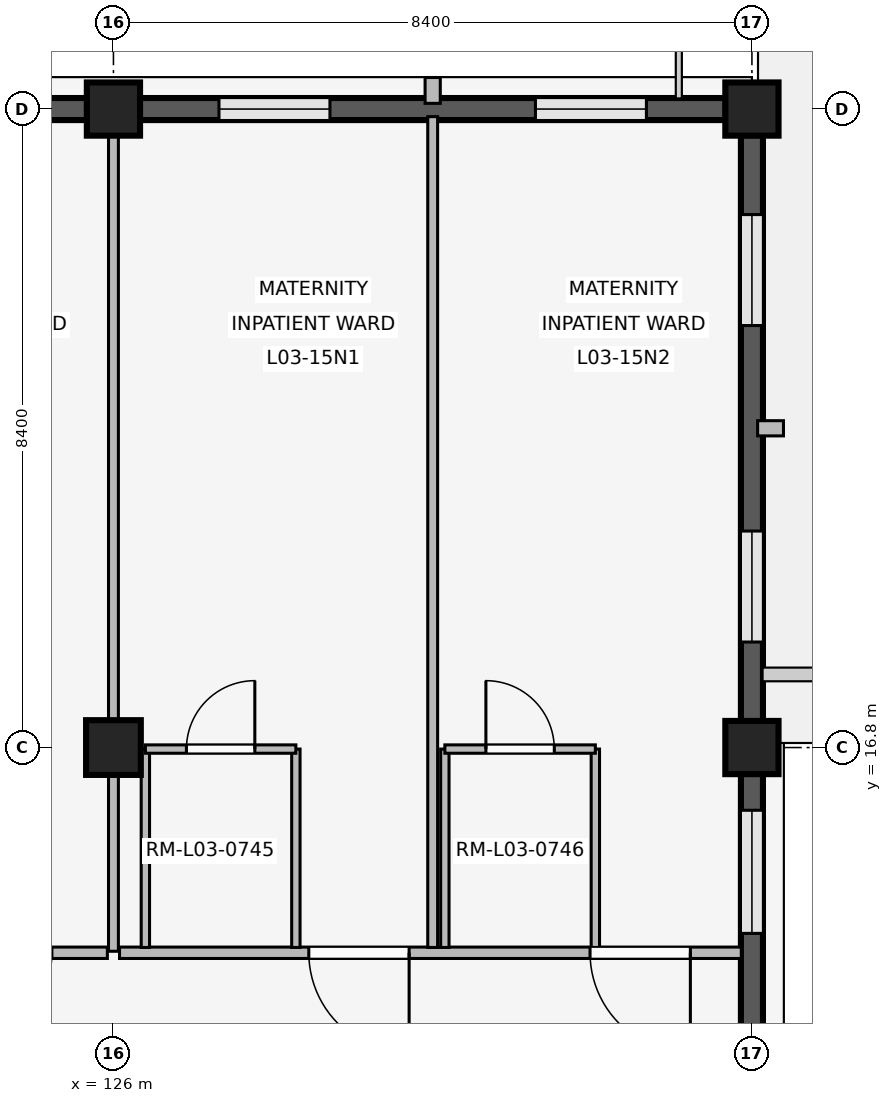
"""IFC4 building model, lengths in metres.
Left out: names, types, materials, properties, quantities, classifications, styles, units other than length and angle.
Written with IfcOpenShell. Run it as: python <this file> out.ifc"""

import sys

from ifc_helpers import new_model, si_unit, direction, frame, frame_2d, origin, origin_2d, place, context, subcontext, project, spatial, rectangle, extrude, element, fill, save


model = new_model("IFC4")
c1 = context("Model", 3, precision=1e-05, world=origin(), true_north=direction((0.0, 1.0)))
c2 = subcontext(c1, "Body", "Model", "MODEL_VIEW")
j1 = project(units=[si_unit("LENGTHUNIT", "METRE"), si_unit("PLANEANGLEUNIT", "RADIAN")], contexts=[c1])
p1 = place(None, origin())
s1 = spatial("IfcSite", under=j1, at=p1, CompositionType="ELEMENT")
p2 = place(p1, origin())
s2 = spatial("IfcBuilding", under=s1, at=p2, CompositionType="ELEMENT")
p3 = place(p2, frame((0.0, 0.0, 12.9)))
s3 = spatial("IfcBuildingStorey", under=s2, at=p3, CompositionType="ELEMENT", Elevation=12.9)
p4 = place(p3, frame((126.0, 16.8, 0.0), z_axis=(0.0, 0.0, 1.0), x_axis=(1.0, 0.0, 0.0)))
e1 = element("IfcColumn", 1, at=p4, inside=s3, PredefinedType="COLUMN", context=c2, shape_type="SweptSolid", body=[
    extrude(rectangle(XDim=0.72, YDim=0.72, at=origin_2d()), origin(), (0.0, 0.0, 1.0), 3.3),
])
for number, where, z_axis, x_axis in (
    (2, (126.0, 25.2, 0.0), (0.0, 0.0, 1.0), (1.0, 0.0, 0.0)),
    (3, (134.4, 16.8, 0.0), (0.0, 0.0, 1.0), (1.0, 0.0, 0.0)),
    (4, (134.4, 25.2, 0.0), (0.0, 0.0, 1.0), (1.0, 0.0, 0.0)),
):
    element("IfcColumn", number, at=place(p3, frame(where, z_axis=z_axis, x_axis=x_axis)), inside=s3, PredefinedType="COLUMN", context=c2, shape_type="SweptSolid", body=[
        extrude(rectangle(XDim=0.7, YDim=0.7, at=origin_2d()), origin(), (0.0, 0.0, 1.0), 3.3),
    ])
p5 = place(p3, frame((117.945, 25.2, 0.0), z_axis=(0.0, 0.0, 1.0), x_axis=(1.0, 0.0, 0.0)))
e5 = element("IfcWall", 5, at=p5, inside=s3, PredefinedType="SOLIDWALL", context=c2, shape_type="SweptSolid", body=[
    extrude(rectangle(XDim=7.71, YDim=0.29, at=frame_2d((3.855, 0.0))), origin(), (0.0, 0.0, 1.0), 2.44),
])
p6 = place(p5, frame((0.963, 0.0, 0.85)))
e6 = element("IfcOpeningElement", 6, at=p6, cuts=e5, PredefinedType="OPENING", context=c2, shape_type="SweptSolid", body=[
    extrude(rectangle(XDim=1.62, YDim=0.95, at=frame_2d((0.81, 0.475))), frame((0.0, 0.155, 0.0), z_axis=(0.0, -1.0, 0.0), x_axis=(1.0, 0.0, 0.0)), (0.0, 0.0, 1.0), 0.31),
])
p7 = place(p5, frame((5.127, 0.0, 0.85)))
e7 = element("IfcOpeningElement", 7, at=p7, cuts=e5, PredefinedType="OPENING", context=c2, shape_type="SweptSolid", body=[
    extrude(rectangle(XDim=1.62, YDim=0.95, at=frame_2d((0.81, 0.475))), frame((0.0, 0.155, 0.0), z_axis=(0.0, -1.0, 0.0), x_axis=(1.0, 0.0, 0.0)), (0.0, 0.0, 1.0), 0.31),
])
p8 = place(p3, frame((134.4, 16.455, 0.0), z_axis=(0.0, 0.0, 1.0), x_axis=(0.0, -1.0, 0.0)))
e8 = element("IfcWall", 8, at=p8, inside=s3, PredefinedType="SOLIDWALL", context=c2, shape_type="SweptSolid", body=[
    extrude(rectangle(XDim=7.71, YDim=0.29, at=frame_2d((3.855, 0.0))), origin(), (0.0, 0.0, 1.0), 2.44),
])
p9 = place(p8, frame((0.48, 0.0, 0.85)))
e9 = element("IfcOpeningElement", 9, at=p9, cuts=e8, PredefinedType="OPENING", context=c2, shape_type="SweptSolid", body=[
    extrude(rectangle(XDim=1.62, YDim=0.95, at=frame_2d((0.81, 0.475))), frame((0.0, 0.155, 0.0), z_axis=(0.0, -1.0, 0.0), x_axis=(1.0, 0.0, 0.0)), (0.0, 0.0, 1.0), 0.31),
])
p10 = place(p8, frame((5.61, 0.0, 0.85)))
e10 = element("IfcOpeningElement", 10, at=p10, cuts=e8, PredefinedType="OPENING", context=c2, shape_type="SweptSolid", body=[
    extrude(rectangle(XDim=1.62, YDim=0.95, at=frame_2d((0.81, 0.475))), frame((0.0, 0.155, 0.0), z_axis=(0.0, -1.0, 0.0), x_axis=(1.0, 0.0, 0.0)), (0.0, 0.0, 1.0), 0.31),
])
p11 = place(p3, frame((126.345, 25.2, 0.0), z_axis=(0.0, 0.0, 1.0), x_axis=(1.0, 0.0, 0.0)))
e11 = element("IfcWall", 11, at=p11, inside=s3, PredefinedType="SOLIDWALL", context=c2, shape_type="SweptSolid", body=[
    extrude(rectangle(XDim=7.71, YDim=0.29, at=frame_2d((3.855, 0.0))), origin(), (0.0, 0.0, 1.0), 2.44),
])
p12 = place(p11, frame((1.043, 0.0, 0.85)))
e12 = element("IfcOpeningElement", 12, at=p12, cuts=e11, PredefinedType="OPENING", context=c2, shape_type="SweptSolid", body=[
    extrude(rectangle(XDim=1.46, YDim=0.85, at=frame_2d((0.73, 0.425))), frame((0.0, 0.155, 0.0), z_axis=(0.0, -1.0, 0.0), x_axis=(1.0, 0.0, 0.0)), (0.0, 0.0, 1.0), 0.31),
])
p13 = place(p11, frame((5.207, 0.0, 0.85)))
e13 = element("IfcOpeningElement", 13, at=p13, cuts=e11, PredefinedType="OPENING", context=c2, shape_type="SweptSolid", body=[
    extrude(rectangle(XDim=1.46, YDim=0.85, at=frame_2d((0.73, 0.425))), frame((0.0, 0.155, 0.0), z_axis=(0.0, -1.0, 0.0), x_axis=(1.0, 0.0, 0.0)), (0.0, 0.0, 1.0), 0.31),
])
p14 = place(p3, frame((130.2, 25.275, 0.0), z_axis=(0.0, 0.0, 1.0), x_axis=(0.0, 1.0, 0.0)))
e14 = element("IfcWall", 14, at=p14, inside=s3, PredefinedType="ELEMENTEDWALL", context=c2, shape_type="SweptSolid", body=[
    extrude(rectangle(XDim=0.34, YDim=0.2, at=frame_2d((0.17, 0.0))), origin(), (0.0, 0.0, 1.0), 2.42),
])
p15 = place(p3, frame((134.4, 24.855, 0.0), z_axis=(0.0, 0.0, 1.0), x_axis=(0.0, -1.0, 0.0)))
e15 = element("IfcWall", 15, at=p15, inside=s3, PredefinedType="SOLIDWALL", context=c2, shape_type="SweptSolid", body=[
    extrude(rectangle(XDim=7.71, YDim=0.29, at=frame_2d((3.855, 0.0))), origin(), (0.0, 0.0, 1.0), 2.44),
])
p16 = place(p15, frame((1.043, 0.0, 0.85)))
e16 = element("IfcOpeningElement", 16, at=p16, cuts=e15, PredefinedType="OPENING", context=c2, shape_type="SweptSolid", body=[
    extrude(rectangle(XDim=1.46, YDim=0.85, at=frame_2d((0.73, 0.425))), frame((0.0, 0.155, 0.0), z_axis=(0.0, -1.0, 0.0), x_axis=(1.0, 0.0, 0.0)), (0.0, 0.0, 1.0), 0.31),
])
p17 = place(p15, frame((5.207, 0.0, 0.85)))
e17 = element("IfcOpeningElement", 17, at=p17, cuts=e15, PredefinedType="OPENING", context=c2, shape_type="SweptSolid", body=[
    extrude(rectangle(XDim=1.46, YDim=0.85, at=frame_2d((0.73, 0.425))), frame((0.0, 0.155, 0.0), z_axis=(0.0, -1.0, 0.0), x_axis=(1.0, 0.0, 0.0)), (0.0, 0.0, 1.0), 0.31),
])
p18 = place(p3, frame((134.475, 21.0, 0.0), z_axis=(0.0, 0.0, 1.0), x_axis=(1.0, 0.0, 0.0)))
e18 = element("IfcWall", 18, at=p18, inside=s3, PredefinedType="ELEMENTEDWALL", context=c2, shape_type="SweptSolid", body=[
    extrude(rectangle(XDim=0.34, YDim=0.2, at=frame_2d((0.17, 0.0))), origin(), (0.0, 0.0, 1.0), 2.42),
])
p19 = place(p3, frame((125.92, 14.1, 0.0), z_axis=(0.0, 0.0, 1.0), x_axis=(-1.0, 0.0, 0.0)))
e19 = element("IfcWall", 19, at=p19, inside=s3, PredefinedType="PARTITIONING", context=c2, shape_type="SweptSolid", body=[
    extrude(rectangle(XDim=8.24, YDim=0.15, at=frame_2d((4.12, 0.0))), origin(), (0.0, 0.0, 1.0), 2.42),
])
p20 = place(p19, frame((0.73, 0.0, 0.0)))
e20 = element("IfcOpeningElement", 20, at=p20, cuts=e19, PredefinedType="OPENING", context=c2, shape_type="SweptSolid", body=[
    extrude(rectangle(XDim=1.32, YDim=2.25, at=frame_2d((0.66, 1.125))), frame((0.0, 0.085, 0.0), z_axis=(0.0, -1.0, 0.0), x_axis=(1.0, 0.0, 0.0)), (0.0, 0.0, 1.0), 0.17),
])
p21 = place(p19, frame((4.43, 0.0, 0.0)))
e21 = element("IfcOpeningElement", 21, at=p21, cuts=e19, PredefinedType="OPENING", context=c2, shape_type="SweptSolid", body=[
    extrude(rectangle(XDim=1.32, YDim=2.25, at=frame_2d((0.66, 1.125))), frame((0.0, 0.085, 0.0), z_axis=(0.0, -1.0, 0.0), x_axis=(1.0, 0.0, 0.0)), (0.0, 0.0, 1.0), 0.17),
])
p22 = place(p3, frame((126.0, 14.12, 0.0), z_axis=(0.0, 0.0, 1.0), x_axis=(0.0, 1.0, 0.0)))
e22 = element("IfcWall", 22, at=p22, inside=s3, PredefinedType="PARTITIONING", context=c2, shape_type="SweptSolid", body=[
    extrude(rectangle(XDim=10.94, YDim=0.13, at=frame_2d((5.47, 0.0))), origin(), (0.0, 0.0, 1.0), 2.42),
])
p23 = place(p3, frame((134.26, 14.1, 0.0), z_axis=(0.0, 0.0, 1.0), x_axis=(-1.0, 0.0, 0.0)))
e23 = element("IfcWall", 23, at=p23, inside=s3, PredefinedType="PARTITIONING", context=c2, shape_type="SweptSolid", body=[
    extrude(rectangle(XDim=8.18, YDim=0.15, at=frame_2d((4.09, 0.0))), origin(), (0.0, 0.0, 1.0), 2.42),
])
p24 = place(p23, frame((0.67, 0.0, 0.0)))
e24 = element("IfcOpeningElement", 24, at=p24, cuts=e23, PredefinedType="OPENING", context=c2, shape_type="SweptSolid", body=[
    extrude(rectangle(XDim=1.32, YDim=2.25, at=frame_2d((0.66, 1.125))), frame((0.0, 0.085, 0.0), z_axis=(0.0, -1.0, 0.0), x_axis=(1.0, 0.0, 0.0)), (0.0, 0.0, 1.0), 0.17),
])
p25 = place(p23, frame((4.37, 0.0, 0.0)))
e25 = element("IfcOpeningElement", 25, at=p25, cuts=e23, PredefinedType="OPENING", context=c2, shape_type="SweptSolid", body=[
    extrude(rectangle(XDim=1.32, YDim=2.25, at=frame_2d((0.66, 1.125))), frame((0.0, 0.085, 0.0), z_axis=(0.0, -1.0, 0.0), x_axis=(1.0, 0.0, 0.0)), (0.0, 0.0, 1.0), 0.17),
])
p26 = place(p3, frame((130.2, 14.17, 0.0), z_axis=(0.0, 0.0, 1.0), x_axis=(0.0, 1.0, 0.0)))
e26 = element("IfcWall", 26, at=p26, inside=s3, PredefinedType="PARTITIONING", context=c2, shape_type="SweptSolid", body=[
    extrude(rectangle(XDim=10.93, YDim=0.13, at=frame_2d((5.465, 0.0))), origin(), (0.0, 0.0, 1.0), 2.42),
])
for number, where, z_axis, x_axis in (
    (27, (126.42, 14.17, 0.0), (0.0, 0.0, 1.0), (0.0, 1.0, 0.0)),
    (28, (128.4, 14.17, 0.0), (0.0, 0.0, 1.0), (0.0, 1.0, 0.0)),
):
    element("IfcWall", number, at=place(p3, frame(where, z_axis=z_axis, x_axis=x_axis)), inside=s3, PredefinedType="PARTITIONING", context=c2, shape_type="SweptSolid", body=[
        extrude(rectangle(XDim=2.61, YDim=0.11, at=frame_2d((1.305, 0.0))), origin(), (0.0, 0.0, 1.0), 2.42),
    ])
p27 = place(p3, frame((126.42, 16.78, 0.0), z_axis=(0.0, 0.0, 1.0), x_axis=(1.0, 0.0, 0.0)))
e29 = element("IfcWall", 29, at=p27, inside=s3, PredefinedType="PARTITIONING", context=c2, shape_type="SweptSolid", body=[
    extrude(rectangle(XDim=1.98, YDim=0.11, at=frame_2d((0.99, 0.0))), origin(), (0.0, 0.0, 1.0), 2.42),
])
p28 = place(p27, frame((0.54, 0.0, 0.0)))
e30 = element("IfcOpeningElement", 30, at=p28, cuts=e29, PredefinedType="OPENING", context=c2, shape_type="SweptSolid", body=[
    extrude(rectangle(XDim=0.9, YDim=2.1, at=frame_2d((0.45, 1.05))), frame((0.0, 0.065, 0.0), z_axis=(0.0, -1.0, 0.0), x_axis=(1.0, 0.0, 0.0)), (0.0, 0.0, 1.0), 0.13),
])
for number, where, z_axis, x_axis in (
    (31, (130.36, 14.17, 0.0), (0.0, 0.0, 1.0), (0.0, 1.0, 0.0)),
    (32, (132.34, 14.17, 0.0), (0.0, 0.0, 1.0), (0.0, 1.0, 0.0)),
):
    element("IfcWall", number, at=place(p3, frame(where, z_axis=z_axis, x_axis=x_axis)), inside=s3, PredefinedType="PARTITIONING", context=c2, shape_type="SweptSolid", body=[
        extrude(rectangle(XDim=2.61, YDim=0.11, at=frame_2d((1.305, 0.0))), origin(), (0.0, 0.0, 1.0), 2.42),
    ])
p29 = place(p3, frame((130.36, 16.78, 0.0), z_axis=(0.0, 0.0, 1.0), x_axis=(1.0, 0.0, 0.0)))
e33 = element("IfcWall", 33, at=p29, inside=s3, PredefinedType="PARTITIONING", context=c2, shape_type="SweptSolid", body=[
    extrude(rectangle(XDim=1.98, YDim=0.11, at=frame_2d((0.99, 0.0))), origin(), (0.0, 0.0, 1.0), 2.42),
])
p30 = place(p29, frame((0.54, 0.0, 0.0)))
e34 = element("IfcOpeningElement", 34, at=p30, cuts=e33, PredefinedType="OPENING", context=c2, shape_type="SweptSolid", body=[
    extrude(rectangle(XDim=0.9, YDim=2.1, at=frame_2d((0.45, 1.05))), frame((0.0, 0.065, 0.0), z_axis=(0.0, -1.0, 0.0), x_axis=(1.0, 0.0, 0.0)), (0.0, 0.0, 1.0), 0.13),
])
p31 = place(p9, origin())
e35 = element("IfcWindow", 35, at=p31, inside=s3, PartitioningType="SINGLE_PANEL", PredefinedType="WINDOW", context=c2, shape_type="SweptSolid", body=[
    extrude(rectangle(XDim=1.62, YDim=0.95, at=frame_2d((0.81, 0.475))), frame((0.0, 0.03, 0.0), z_axis=(0.0, -1.0, 0.0), x_axis=(1.0, 0.0, 0.0)), (0.0, 0.0, 1.0), 0.06),
])
fill(e9, e35)
p32 = place(p12, origin())
e36 = element("IfcWindow", 36, at=p32, inside=s3, PartitioningType="SINGLE_PANEL", PredefinedType="WINDOW", context=c2, shape_type="SweptSolid", body=[
    extrude(rectangle(XDim=1.46, YDim=0.85, at=frame_2d((0.73, 0.425))), frame((0.0, 0.03, 0.0), z_axis=(0.0, -1.0, 0.0), x_axis=(1.0, 0.0, 0.0)), (0.0, 0.0, 1.0), 0.06),
])
fill(e12, e36)
p33 = place(p13, origin())
e37 = element("IfcWindow", 37, at=p33, inside=s3, PartitioningType="SINGLE_PANEL", PredefinedType="WINDOW", context=c2, shape_type="SweptSolid", body=[
    extrude(rectangle(XDim=1.46, YDim=0.85, at=frame_2d((0.73, 0.425))), frame((0.0, 0.03, 0.0), z_axis=(0.0, -1.0, 0.0), x_axis=(1.0, 0.0, 0.0)), (0.0, 0.0, 1.0), 0.06),
])
fill(e13, e37)
p34 = place(p16, origin())
e38 = element("IfcWindow", 38, at=p34, inside=s3, PartitioningType="SINGLE_PANEL", PredefinedType="WINDOW", context=c2, shape_type="SweptSolid", body=[
    extrude(rectangle(XDim=1.46, YDim=0.85, at=frame_2d((0.73, 0.425))), frame((0.0, 0.03, 0.0), z_axis=(0.0, -1.0, 0.0), x_axis=(1.0, 0.0, 0.0)), (0.0, 0.0, 1.0), 0.06),
])
fill(e16, e38)
p35 = place(p17, origin())
e39 = element("IfcWindow", 39, at=p35, inside=s3, PartitioningType="SINGLE_PANEL", PredefinedType="WINDOW", context=c2, shape_type="SweptSolid", body=[
    extrude(rectangle(XDim=1.46, YDim=0.85, at=frame_2d((0.73, 0.425))), frame((0.0, 0.03, 0.0), z_axis=(0.0, -1.0, 0.0), x_axis=(1.0, 0.0, 0.0)), (0.0, 0.0, 1.0), 0.06),
])
fill(e17, e39)
p36 = place(p24, origin())
e40 = element("IfcDoor", 40, at=p36, inside=s3, OperationType="SINGLE_SWING_LEFT", PredefinedType="DOOR", context=c2, shape_type="SweptSolid", body=[
    extrude(rectangle(XDim=1.32, YDim=2.25, at=frame_2d((0.66, 1.125))), frame((0.0, 0.025, 0.0), z_axis=(0.0, -1.0, 0.0), x_axis=(1.0, 0.0, 0.0)), (0.0, 0.0, 1.0), 0.05),
])
fill(e24, e40)
p37 = place(p25, origin())
e41 = element("IfcDoor", 41, at=p37, inside=s3, OperationType="SINGLE_SWING_LEFT", PredefinedType="DOOR", context=c2, shape_type="SweptSolid", body=[
    extrude(rectangle(XDim=1.32, YDim=2.25, at=frame_2d((0.66, 1.125))), frame((0.0, 0.025, 0.0), z_axis=(0.0, -1.0, 0.0), x_axis=(1.0, 0.0, 0.0)), (0.0, 0.0, 1.0), 0.05),
])
fill(e25, e41)
p38 = place(p28, origin())
e42 = element("IfcDoor", 42, at=p38, inside=s3, OperationType="SINGLE_SWING_RIGHT", PredefinedType="DOOR", context=c2, shape_type="SweptSolid", body=[
    extrude(rectangle(XDim=0.9, YDim=2.1, at=frame_2d((0.45, 1.05))), frame((0.0, 0.025, 0.0), z_axis=(0.0, -1.0, 0.0), x_axis=(1.0, 0.0, 0.0)), (0.0, 0.0, 1.0), 0.05),
])
fill(e30, e42)
p39 = place(p30, origin())
e43 = element("IfcDoor", 43, at=p39, inside=s3, OperationType="SINGLE_SWING_LEFT", PredefinedType="DOOR", context=c2, shape_type="SweptSolid", body=[
    extrude(rectangle(XDim=0.9, YDim=2.1, at=frame_2d((0.45, 1.05))), frame((0.0, 0.025, 0.0), z_axis=(0.0, -1.0, 0.0), x_axis=(1.0, 0.0, 0.0)), (0.0, 0.0, 1.0), 0.05),
])
fill(e34, e43)
save(model, sys.argv[1])
